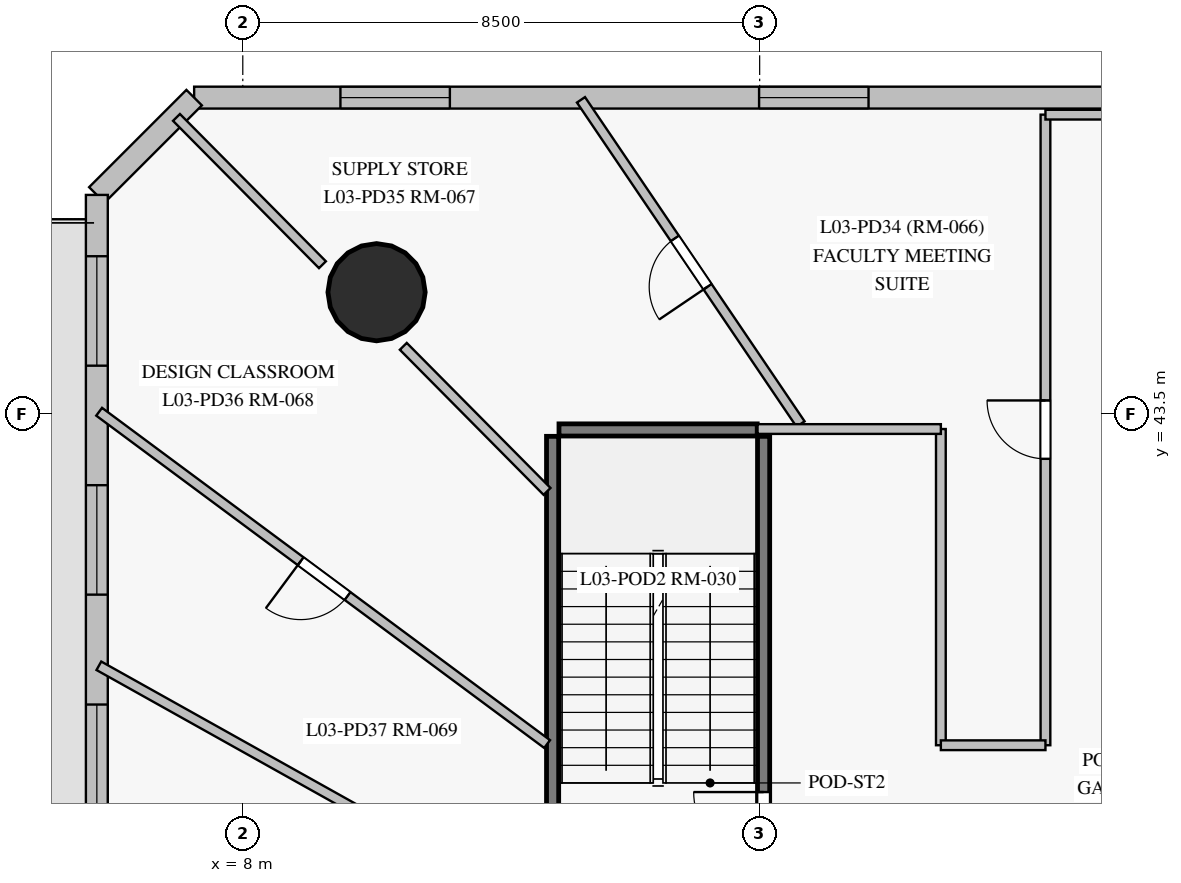
"""IFC4 building model, lengths in metres.
Left out: names, types, materials, properties, quantities, classifications, styles, units other than length and angle.
Written with IfcOpenShell. Run it as: python <this file> out.ifc"""

import sys

from ifc_helpers import new_model, si_unit, direction, frame, frame_2d, origin, origin_with_axes, origin_2d, place, context, subcontext, project, spatial, rectangle, circle, extrude, source, transform, mapped, element, fill, save


model = new_model("IFC4")
c1 = context("Model", 3, precision=1e-05, world=origin(), true_north=direction((0.0, 1.0)))
c2 = subcontext(c1, "Body", "Model", "MODEL_VIEW")
j1 = project(units=[si_unit("LENGTHUNIT", "METRE"), si_unit("PLANEANGLEUNIT", "RADIAN")], contexts=[c1])
p1 = place(None, origin())
s1 = spatial("IfcSite", under=j1, at=p1, CompositionType="ELEMENT")
p2 = place(p1, origin())
s2 = spatial("IfcBuilding", under=s1, at=p2, CompositionType="ELEMENT")
p3 = place(p2, frame((0.0, 0.0, 13.5)))
s3 = spatial("IfcBuildingStorey", under=s2, at=p3, CompositionType="ELEMENT", Elevation=13.5)
m1 = source(origin_with_axes(), c2, "Body", "SweptSolid", [
    extrude(circle(Radius=0.8, at=origin_2d()), origin(), (0.0, 0.0, 1.0), 4.5),
])
p4 = place(p3, frame((10.2, 45.5, 0.0), z_axis=(0.0, 0.0, 1.0), x_axis=(1.0, 0.0, 0.0)))
e1 = element("IfcColumn", 1, at=p4, inside=s3, PredefinedType="COLUMN", context=c2, shape_type="MappedRepresentation", body=[
    mapped(m1, transform((0.0, 0.0, 0.0), scale=1.0)),
])
p5 = place(p3, frame((54.0, 48.7, 0.0), z_axis=(0.0, 0.0, 1.0), x_axis=(-1.0, 0.0, 0.0)))
e2 = element("IfcWall", 2, at=p5, inside=s3, PredefinedType="SOLIDWALL", context=c2, shape_type="SweptSolid", body=[
    extrude(rectangle(XDim=46.8, YDim=0.36, at=frame_2d((23.4, 0.0))), origin(), (0.0, 0.0, 1.0), 4.225),
])
p6 = place(p5, frame((1.936, 0.0, 0.85)))
e3 = element("IfcOpeningElement", 3, at=p6, cuts=e2, PredefinedType="OPENING", context=c2, shape_type="SweptSolid", body=[
    extrude(rectangle(XDim=1.8, YDim=2.2, at=frame_2d((0.9, 1.1))), frame((0.0, 0.19, 0.0), z_axis=(0.0, -1.0, 0.0), x_axis=(1.0, 0.0, 0.0)), (0.0, 0.0, 1.0), 0.38),
])
p7 = place(p5, frame((6.753, 0.0, 0.85)))
e4 = element("IfcOpeningElement", 4, at=p7, cuts=e2, PredefinedType="OPENING", context=c2, shape_type="SweptSolid", body=[
    extrude(rectangle(XDim=1.8, YDim=2.2, at=frame_2d((0.9, 1.1))), frame((0.0, 0.19, 0.0), z_axis=(0.0, -1.0, 0.0), x_axis=(1.0, 0.0, 0.0)), (0.0, 0.0, 1.0), 0.38),
])
p8 = place(p5, frame((11.418, 0.0, 0.85)))
e5 = element("IfcOpeningElement", 5, at=p8, cuts=e2, PredefinedType="OPENING", context=c2, shape_type="SweptSolid", body=[
    extrude(rectangle(XDim=1.8, YDim=2.2, at=frame_2d((0.9, 1.1))), frame((0.0, 0.19, 0.0), z_axis=(0.0, -1.0, 0.0), x_axis=(1.0, 0.0, 0.0)), (0.0, 0.0, 1.0), 0.38),
])
p9 = place(p5, frame((15.637, 0.0, 0.85)))
e6 = element("IfcOpeningElement", 6, at=p9, cuts=e2, PredefinedType="OPENING", context=c2, shape_type="SweptSolid", body=[
    extrude(rectangle(XDim=1.8, YDim=2.2, at=frame_2d((0.9, 1.1))), frame((0.0, 0.19, 0.0), z_axis=(0.0, -1.0, 0.0), x_axis=(1.0, 0.0, 0.0)), (0.0, 0.0, 1.0), 0.38),
])
p10 = place(p5, frame((20.561, 0.0, 0.85)))
e7 = element("IfcOpeningElement", 7, at=p10, cuts=e2, PredefinedType="OPENING", context=c2, shape_type="SweptSolid", body=[
    extrude(rectangle(XDim=1.8, YDim=2.2, at=frame_2d((0.9, 1.1))), frame((0.0, 0.19, 0.0), z_axis=(0.0, -1.0, 0.0), x_axis=(1.0, 0.0, 0.0)), (0.0, 0.0, 1.0), 0.38),
])
p11 = place(p5, frame((25.54, 0.0, 0.85)))
e8 = element("IfcOpeningElement", 8, at=p11, cuts=e2, PredefinedType="OPENING", context=c2, shape_type="SweptSolid", body=[
    extrude(rectangle(XDim=1.8, YDim=2.2, at=frame_2d((0.9, 1.1))), frame((0.0, 0.19, 0.0), z_axis=(0.0, -1.0, 0.0), x_axis=(1.0, 0.0, 0.0)), (0.0, 0.0, 1.0), 0.38),
])
p12 = place(p5, frame((29.8, 0.0, 0.85)))
e9 = element("IfcOpeningElement", 9, at=p12, cuts=e2, PredefinedType="OPENING", context=c2, shape_type="SweptSolid", body=[
    extrude(rectangle(XDim=1.8, YDim=2.2, at=frame_2d((0.9, 1.1))), frame((0.0, 0.19, 0.0), z_axis=(0.0, -1.0, 0.0), x_axis=(1.0, 0.0, 0.0)), (0.0, 0.0, 1.0), 0.38),
])
p13 = place(p5, frame((35.709, 0.0, 0.85)))
e10 = element("IfcOpeningElement", 10, at=p13, cuts=e2, PredefinedType="OPENING", context=c2, shape_type="SweptSolid", body=[
    extrude(rectangle(XDim=1.8, YDim=2.2, at=frame_2d((0.9, 1.1))), frame((0.0, 0.19, 0.0), z_axis=(0.0, -1.0, 0.0), x_axis=(1.0, 0.0, 0.0)), (0.0, 0.0, 1.0), 0.38),
])
p14 = place(p5, frame((42.594, 0.0, 0.85)))
e11 = element("IfcOpeningElement", 11, at=p14, cuts=e2, PredefinedType="OPENING", context=c2, shape_type="SweptSolid", body=[
    extrude(rectangle(XDim=1.8, YDim=2.2, at=frame_2d((0.9, 1.1))), frame((0.0, 0.19, 0.0), z_axis=(0.0, -1.0, 0.0), x_axis=(1.0, 0.0, 0.0)), (0.0, 0.0, 1.0), 0.38),
])
p15 = place(p3, frame((7.2, 48.7, 0.0), z_axis=(0.0, 0.0, 1.0), x_axis=(-0.707106781187, -0.707106781187, 0.0)))
e12 = element("IfcWall", 12, at=p15, inside=s3, PredefinedType="SOLIDWALL", context=c2, shape_type="SweptSolid", body=[
    extrude(rectangle(XDim=2.262, YDim=0.36, at=frame_2d((1.131, 0.0))), origin(), (0.0, 0.0, 1.0), 4.225),
])
p16 = place(p3, frame((5.6, 47.1, 0.0), z_axis=(0.0, 0.0, 1.0), x_axis=(0.0, -1.0, 0.0)))
e13 = element("IfcWall", 13, at=p16, inside=s3, PredefinedType="SOLIDWALL", context=c2, shape_type="SweptSolid", body=[
    extrude(rectangle(XDim=41.2, YDim=0.36, at=frame_2d((20.6, 0.0))), origin(), (0.0, 0.0, 1.0), 4.225),
])
p17 = place(p16, frame((1.008, 0.0, 0.85)))
e14 = element("IfcOpeningElement", 14, at=p17, cuts=e13, PredefinedType="OPENING", context=c2, shape_type="SweptSolid", body=[
    extrude(rectangle(XDim=1.8, YDim=2.2, at=frame_2d((0.9, 1.1))), frame((0.0, 0.19, 0.0), z_axis=(0.0, -1.0, 0.0), x_axis=(1.0, 0.0, 0.0)), (0.0, 0.0, 1.0), 0.38),
])
p18 = place(p16, frame((4.773, 0.0, 0.85)))
e15 = element("IfcOpeningElement", 15, at=p18, cuts=e13, PredefinedType="OPENING", context=c2, shape_type="SweptSolid", body=[
    extrude(rectangle(XDim=1.8, YDim=2.2, at=frame_2d((0.9, 1.1))), frame((0.0, 0.19, 0.0), z_axis=(0.0, -1.0, 0.0), x_axis=(1.0, 0.0, 0.0)), (0.0, 0.0, 1.0), 0.38),
])
p19 = place(p16, frame((8.381, 0.0, 0.85)))
e16 = element("IfcOpeningElement", 16, at=p19, cuts=e13, PredefinedType="OPENING", context=c2, shape_type="SweptSolid", body=[
    extrude(rectangle(XDim=1.8, YDim=2.2, at=frame_2d((0.9, 1.1))), frame((0.0, 0.19, 0.0), z_axis=(0.0, -1.0, 0.0), x_axis=(1.0, 0.0, 0.0)), (0.0, 0.0, 1.0), 0.38),
])
p20 = place(p16, frame((19.996, 0.0, 0.85)))
e17 = element("IfcOpeningElement", 17, at=p20, cuts=e13, PredefinedType="OPENING", context=c2, shape_type="SweptSolid", body=[
    extrude(rectangle(XDim=1.8, YDim=2.2, at=frame_2d((0.9, 1.1))), frame((0.0, 0.19, 0.0), z_axis=(0.0, -1.0, 0.0), x_axis=(1.0, 0.0, 0.0)), (0.0, 0.0, 1.0), 0.38),
])
p21 = place(p16, frame((25.14, 0.0, 0.85)))
e18 = element("IfcOpeningElement", 18, at=p21, cuts=e13, PredefinedType="OPENING", context=c2, shape_type="SweptSolid", body=[
    extrude(rectangle(XDim=1.8, YDim=2.2, at=frame_2d((0.9, 1.1))), frame((0.0, 0.19, 0.0), z_axis=(0.0, -1.0, 0.0), x_axis=(1.0, 0.0, 0.0)), (0.0, 0.0, 1.0), 0.38),
])
p22 = place(p16, frame((29.933, 0.0, 0.85)))
e19 = element("IfcOpeningElement", 19, at=p22, cuts=e13, PredefinedType="OPENING", context=c2, shape_type="SweptSolid", body=[
    extrude(rectangle(XDim=1.8, YDim=2.2, at=frame_2d((0.9, 1.1))), frame((0.0, 0.19, 0.0), z_axis=(0.0, -1.0, 0.0), x_axis=(1.0, 0.0, 0.0)), (0.0, 0.0, 1.0), 0.38),
])
p23 = place(p16, frame((35.617, 0.0, 0.85)))
e20 = element("IfcOpeningElement", 20, at=p23, cuts=e13, PredefinedType="OPENING", context=c2, shape_type="SweptSolid", body=[
    extrude(rectangle(XDim=1.8, YDim=2.2, at=frame_2d((0.9, 1.1))), frame((0.0, 0.19, 0.0), z_axis=(0.0, -1.0, 0.0), x_axis=(1.0, 0.0, 0.0)), (0.0, 0.0, 1.0), 0.38),
])
p24 = place(p16, frame((13.208, 0.0, 0.0)))
e21 = element("IfcOpeningElement", 21, at=p24, cuts=e13, PredefinedType="OPENING", context=c2, shape_type="SweptSolid", body=[
    extrude(rectangle(XDim=1.05, YDim=2.12, at=frame_2d((0.525, 1.06))), frame((0.0, 0.19, 0.0), z_axis=(0.0, -1.0, 0.0), x_axis=(1.0, 0.0, 0.0)), (0.0, 0.0, 1.0), 0.38),
])
p25 = place(p3, frame((13.095, 35.78, 0.0), z_axis=(0.0, 0.0, 1.0), x_axis=(0.0, 1.0, 0.0)))
e22 = element("IfcWall", 22, at=p25, inside=s3, PredefinedType="SHEAR", context=c2, shape_type="SweptSolid", body=[
    extrude(rectangle(XDim=7.35, YDim=0.2, at=frame_2d((3.675, 0.0))), origin(), (0.0, 0.0, 1.0), 4.225),
])
p26 = place(p3, frame((16.565, 35.78, 0.0), z_axis=(0.0, 0.0, 1.0), x_axis=(0.0, 1.0, 0.0)))
e23 = element("IfcWall", 23, at=p26, inside=s3, PredefinedType="SHEAR", context=c2, shape_type="SweptSolid", body=[
    extrude(rectangle(XDim=7.35, YDim=0.2, at=frame_2d((3.675, 0.0))), origin(), (0.0, 0.0, 1.0), 4.225),
])
p27 = place(p26, frame((0.35, 0.0, 0.0)))
e24 = element("IfcOpeningElement", 24, at=p27, cuts=e23, PredefinedType="OPENING", context=c2, shape_type="SweptSolid", body=[
    extrude(rectangle(XDim=1.15, YDim=2.15, at=frame_2d((0.575, 1.075))), frame((0.0, 0.11, 0.0), z_axis=(0.0, -1.0, 0.0), x_axis=(1.0, 0.0, 0.0)), (0.0, 0.0, 1.0), 0.22),
])
p28 = place(p3, frame((13.2, 43.235, 0.0), z_axis=(0.0, 0.0, 1.0), x_axis=(1.0, 0.0, 0.0)))
e25 = element("IfcWall", 25, at=p28, inside=s3, PredefinedType="SHEAR", context=c2, shape_type="SweptSolid", body=[
    extrude(rectangle(XDim=3.26, YDim=0.2, at=frame_2d((1.63, 0.0))), origin(), (0.0, 0.0, 1.0), 4.225),
])
p29 = place(p3, frame((16.068, 33.521, 0.0), z_axis=(0.0, 0.0, 1.0), x_axis=(-0.872792797225, 0.488090906607, 0.0)))
e26 = element("IfcWall", 26, at=p29, inside=s3, PredefinedType="PARTITIONING", context=c2, shape_type="SweptSolid", body=[
    extrude(rectangle(XDim=11.956, YDim=0.16, at=frame_2d((5.978, 0.0))), origin(), (0.0, 0.0, 1.0), 4.225),
])
p30 = place(p3, frame((21.2, 38.05, 0.0), z_axis=(0.0, 0.0, 1.0), x_axis=(0.0, 1.0, 0.0)))
e27 = element("IfcWall", 27, at=p30, inside=s3, PredefinedType="PARTITIONING", context=c2, shape_type="SweptSolid", body=[
    extrude(rectangle(XDim=10.37, YDim=0.16, at=frame_2d((5.185, 0.0))), origin(), (0.0, 0.0, 1.0), 4.225),
])
p31 = place(p30, frame((4.71, 0.0, 0.0)))
e28 = element("IfcOpeningElement", 28, at=p31, cuts=e27, PredefinedType="OPENING", context=c2, shape_type="SweptSolid", body=[
    extrude(rectangle(XDim=0.96, YDim=2.15, at=frame_2d((0.48, 1.075))), frame((0.0, 0.09, 0.0), z_axis=(0.0, -1.0, 0.0), x_axis=(1.0, 0.0, 0.0)), (0.0, 0.0, 1.0), 0.18),
])
p32 = place(p3, frame((13.005, 38.069, 0.0), z_axis=(0.0, 0.0, 1.0), x_axis=(-0.803144450806, 0.595784349526, 0.0)))
e29 = element("IfcWall", 29, at=p32, inside=s3, PredefinedType="PARTITIONING", context=c2, shape_type="SweptSolid", body=[
    extrude(rectangle(XDim=9.173, YDim=0.16, at=frame_2d((4.586, 0.0))), origin(), (0.0, 0.0, 1.0), 4.225),
])
p33 = place(p32, frame((4.086, 0.0, 0.0)))
e30 = element("IfcOpeningElement", 30, at=p33, cuts=e29, PredefinedType="OPENING", context=c2, shape_type="SweptSolid", body=[
    extrude(rectangle(XDim=0.96, YDim=2.15, at=frame_2d((0.48, 1.075))), frame((0.0, 0.09, 0.0), z_axis=(0.0, -1.0, 0.0), x_axis=(1.0, 0.0, 0.0)), (0.0, 0.0, 1.0), 0.18),
])
p34 = place(p3, frame((17.173, 43.332, 0.0), z_axis=(0.0, 0.0, 1.0), x_axis=(-0.560765989322, 0.827974338503, 0.0)))
e31 = element("IfcWall", 31, at=p34, inside=s3, PredefinedType="PARTITIONING", context=c2, shape_type="SweptSolid", body=[
    extrude(rectangle(XDim=6.439, YDim=0.16, at=frame_2d((3.22, 0.0))), origin(), (0.0, 0.0, 1.0), 4.225),
])
p35 = place(p34, frame((2.727, 0.0, 0.0)))
e32 = element("IfcOpeningElement", 32, at=p35, cuts=e31, PredefinedType="OPENING", context=c2, shape_type="SweptSolid", body=[
    extrude(rectangle(XDim=0.96, YDim=2.15, at=frame_2d((0.48, 1.075))), frame((0.0, 0.09, 0.0), z_axis=(0.0, -1.0, 0.0), x_axis=(1.0, 0.0, 0.0)), (0.0, 0.0, 1.0), 0.18),
])
p36 = place(p3, frame((19.48, 43.25, 0.0), z_axis=(0.0, 0.0, 1.0), x_axis=(0.0, -1.0, 0.0)))
e33 = element("IfcWall", 33, at=p36, inside=s3, PredefinedType="PARTITIONING", context=c2, shape_type="SweptSolid", body=[
    extrude(rectangle(XDim=5.2, YDim=0.16, at=frame_2d((2.6, 0.0))), origin(), (0.0, 0.0, 1.0), 4.225),
])
p37 = place(p3, frame((21.2, 48.42, 0.0), z_axis=(0.0, 0.0, 1.0), x_axis=(1.0, 0.0, 0.0)))
e34 = element("IfcWall", 34, at=p37, inside=s3, PredefinedType="PARTITIONING", context=c2, shape_type="SweptSolid", body=[
    extrude(rectangle(XDim=4.2, YDim=0.16, at=frame_2d((2.1, 0.0))), origin(), (0.0, 0.0, 1.0), 4.225),
])
p38 = place(p3, frame((9.31, 45.952, 0.0), z_axis=(0.0, 0.0, 1.0), x_axis=(-0.70384207674, 0.710356481641, 0.0)))
e35 = element("IfcWall", 35, at=p38, inside=s3, PredefinedType="PARTITIONING", context=c2, shape_type="SweptSolid", body=[
    extrude(rectangle(XDim=3.41, YDim=0.16, at=frame_2d((1.705, 0.0))), origin(), (0.0, 0.0, 1.0), 4.225),
])
p39 = place(p3, frame((13.004, 42.224, 0.0), z_axis=(0.0, 0.0, 1.0), x_axis=(-0.703864643425, 0.710334121197, 0.0)))
e36 = element("IfcWall", 36, at=p39, inside=s3, PredefinedType="PARTITIONING", context=c2, shape_type="SweptSolid", body=[
    extrude(rectangle(XDim=3.359, YDim=0.16, at=frame_2d((1.679, 0.0))), origin(), (0.0, 0.0, 1.0), 3.275),
])
p40 = place(p3, frame((16.465, 43.25, 0.0), z_axis=(0.0, 0.0, 1.0), x_axis=(1.0, 0.0, 0.0)))
e37 = element("IfcWall", 37, at=p40, inside=s3, PredefinedType="PARTITIONING", context=c2, shape_type="SweptSolid", body=[
    extrude(rectangle(XDim=3.015, YDim=0.16, at=frame_2d((1.507, 0.0))), origin(), (0.0, 0.0, 1.0), 4.225),
])
p41 = place(p3, frame((19.48, 38.05, 0.0), z_axis=(0.0, 0.0, 1.0), x_axis=(1.0, 0.0, 0.0)))
e38 = element("IfcWall", 38, at=p41, inside=s3, PredefinedType="PARTITIONING", context=c2, shape_type="SweptSolid", body=[
    extrude(rectangle(XDim=1.72, YDim=0.16, at=frame_2d((0.86, 0.0))), origin(), (0.0, 0.0, 1.0), 4.225),
])
m2 = source(origin_with_axes(), c2, "Body", "SweptSolid", [
    extrude(rectangle(XDim=1.8, YDim=2.2, at=frame_2d((0.9, 1.1))), frame((0.0, 0.03, 0.0), z_axis=(0.0, -1.0, 0.0), x_axis=(1.0, 0.0, 0.0)), (0.0, 0.0, 1.0), 0.06),
])
p42 = place(p13, origin())
e39 = element("IfcWindow", 39, at=p42, inside=s3, PartitioningType="SINGLE_PANEL", PredefinedType="WINDOW", context=c2, shape_type="MappedRepresentation", body=[
    mapped(m2, transform((0.0, 0.0, 0.0), scale=1.0)),
])
fill(e10, e39)
p43 = place(p14, origin())
e40 = element("IfcWindow", 40, at=p43, inside=s3, PartitioningType="SINGLE_PANEL", PredefinedType="WINDOW", context=c2, shape_type="MappedRepresentation", body=[
    mapped(m2, transform((0.0, 0.0, 0.0), scale=1.0)),
])
fill(e11, e40)
p44 = place(p17, origin())
e41 = element("IfcWindow", 41, at=p44, inside=s3, PartitioningType="SINGLE_PANEL", PredefinedType="WINDOW", context=c2, shape_type="MappedRepresentation", body=[
    mapped(m2, transform((0.0, 0.0, 0.0), scale=1.0)),
])
fill(e14, e41)
p45 = place(p18, origin())
e42 = element("IfcWindow", 42, at=p45, inside=s3, PartitioningType="SINGLE_PANEL", PredefinedType="WINDOW", context=c2, shape_type="MappedRepresentation", body=[
    mapped(m2, transform((0.0, 0.0, 0.0), scale=1.0)),
])
fill(e15, e42)
p46 = place(p19, origin())
e43 = element("IfcWindow", 43, at=p46, inside=s3, PartitioningType="SINGLE_PANEL", PredefinedType="WINDOW", context=c2, shape_type="MappedRepresentation", body=[
    mapped(m2, transform((0.0, 0.0, 0.0), scale=1.0)),
])
fill(e16, e43)
m3 = source(origin_with_axes(), c2, "Body", "SweptSolid", [
    extrude(rectangle(XDim=1.15, YDim=2.15, at=frame_2d((0.575, 1.075))), frame((0.0, 0.025, 0.0), z_axis=(0.0, -1.0, 0.0), x_axis=(1.0, 0.0, 0.0)), (0.0, 0.0, 1.0), 0.05),
])
p47 = place(p27, origin())
e44 = element("IfcDoor", 44, at=p47, inside=s3, OperationType="SINGLE_SWING_RIGHT", PredefinedType="DOOR", context=c2, shape_type="MappedRepresentation", body=[
    mapped(m3, transform((0.0, 0.0, 0.0), scale=1.0)),
])
fill(e24, e44)
m4 = source(origin_with_axes(), c2, "Body", "SweptSolid", [
    extrude(rectangle(XDim=0.96, YDim=2.15, at=frame_2d((0.48, 1.075))), frame((0.0, 0.025, 0.0), z_axis=(0.0, -1.0, 0.0), x_axis=(1.0, 0.0, 0.0)), (0.0, 0.0, 1.0), 0.05),
])
p48 = place(p31, origin())
e45 = element("IfcDoor", 45, at=p48, inside=s3, OperationType="SINGLE_SWING_RIGHT", PredefinedType="DOOR", context=c2, shape_type="MappedRepresentation", body=[
    mapped(m4, transform((0.0, 0.0, 0.0), scale=1.0)),
])
fill(e28, e45)
p49 = place(p35, origin())
e46 = element("IfcDoor", 46, at=p49, inside=s3, OperationType="SINGLE_SWING_LEFT", PredefinedType="DOOR", context=c2, shape_type="MappedRepresentation", body=[
    mapped(m4, transform((0.0, 0.0, 0.0), scale=1.0)),
])
fill(e32, e46)
p50 = place(p33, origin())
e47 = element("IfcDoor", 47, at=p50, inside=s3, OperationType="SINGLE_SWING_RIGHT", PredefinedType="DOOR", context=c2, shape_type="MappedRepresentation", body=[
    mapped(m4, transform((0.0, 0.0, 0.0), scale=1.0)),
])
fill(e30, e47)
save(model, sys.argv[1])
